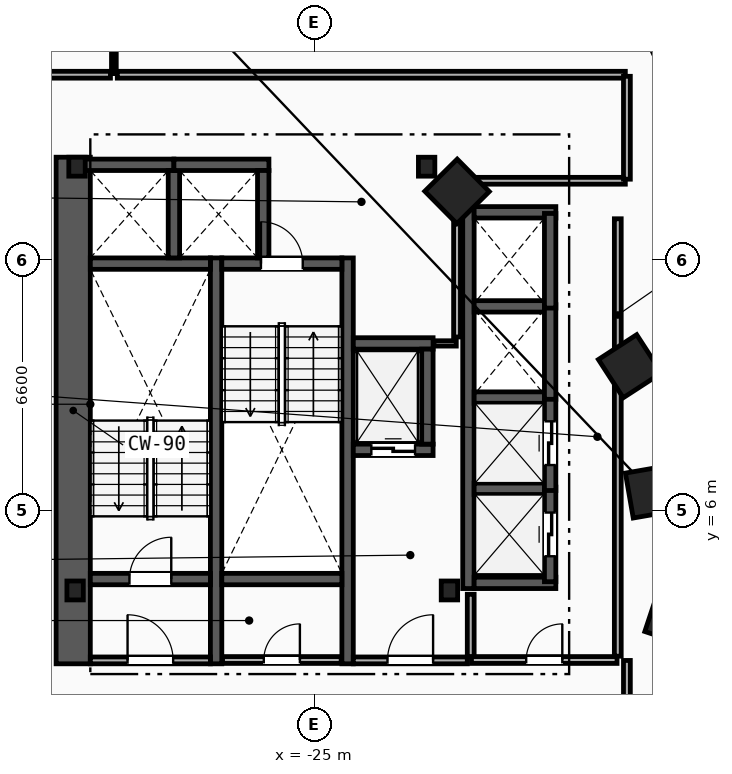
"""IFC4 building model, lengths in metres.
Left out: names, types, materials, properties, quantities, classifications, styles, units other than length and angle.
Written with IfcOpenShell. Run it as: python <this file> out.ifc"""

import sys

from ifc_helpers import new_model, si_unit, direction, frame, frame_2d, origin, origin_2d, place, context, subcontext, project, spatial, rectangle, i_section, extrude, element, fill, save


model = new_model("IFC4")
c1 = context("Model", 3, precision=1e-05, world=origin(), true_north=direction((0.0, 1.0)))
c2 = subcontext(c1, "Body", "Model", "MODEL_VIEW")
j1 = project(units=[si_unit("LENGTHUNIT", "METRE"), si_unit("PLANEANGLEUNIT", "RADIAN")], contexts=[c1])
p1 = place(None, origin())
s1 = spatial("IfcSite", under=j1, at=p1, CompositionType="ELEMENT")
p2 = place(p1, origin())
s2 = spatial("IfcBuilding", under=s1, at=p2, CompositionType="ELEMENT")
p3 = place(p2, frame((0.0, 0.0, 50.6)))
s3 = spatial("IfcBuildingStorey", under=s2, at=p3, CompositionType="ELEMENT", Elevation=50.6)
for number, where, z_axis, x_axis in (
    (1, (-31.3, 3.9, 0.0), (0.0, 0.0, 1.0), (1.0, 0.0, 0.0)),
    (2, (-21.45, 3.9, 0.0), (0.0, 0.0, 1.0), (1.0, 0.0, 0.0)),
    (3, (-22.05, 15.05, 0.0), (0.0, 0.0, 1.0), (1.0, 0.0, 0.0)),
    (4, (-31.25, 15.05, 0.0), (0.0, 0.0, 1.0), (1.0, 0.0, 0.0)),
):
    element("IfcColumn", number, at=place(p3, frame(where, z_axis=z_axis, x_axis=x_axis)), inside=s3, PredefinedType="COLUMN", context=c2, shape_type="SweptSolid", body=[
        extrude(i_section(OverallWidth=0.432, OverallDepth=0.498, WebThickness=0.056, FlangeThickness=0.089, FilletRadius=0.018, at=origin_2d()), origin(), (0.0, 0.0, 1.0), 3.8),
    ])
for number, where, z_axis, x_axis in (
    (5, (-15.55, 3.2, 0.0), (0.0, 0.0, 1.0), (0.315, 0.949, 0.0)),
    (6, (-16.125, 6.5, 0.0), (0.0, 0.0, 1.0), (-0.172, 0.985, 0.0)),
    (7, (-16.7, 9.8, 0.0), (0.0, 0.0, 1.0), (-0.544, 0.839, 0.0)),
    (8, (-21.25, 14.4, 0.0), (0.0, 0.0, 1.0), (-0.703, 0.711, 0.0)),
):
    element("IfcColumn", number, at=place(p3, frame(where, z_axis=z_axis, x_axis=x_axis)), inside=s3, PredefinedType="COLUMN", context=c2, shape_type="SweptSolid", body=[
        extrude(rectangle(XDim=1.2, YDim=1.2, at=origin_2d()), origin(), (0.0, 0.0, 1.0), 3.8),
    ])
p4 = place(p3, frame((-31.35, 1.97, 0.0), z_axis=(0.0, 0.0, 1.0), x_axis=(0.0, 1.0, 0.0)))
e9 = element("IfcWall", 9, at=p4, inside=s3, PredefinedType="SHEAR", context=c2, shape_type="SweptSolid", body=[
    extrude(rectangle(XDim=13.33, YDim=0.9, at=frame_2d((6.665, 0.0))), origin(), (0.0, 0.0, 1.0), 3.5),
])
for number, where, z_axis, x_axis in (
    (10, (-27.59, 1.97, 0.0), (0.0, 0.0, 1.0), (0.0, 1.0, 0.0)),
    (11, (-24.13, 1.97, 0.0), (0.0, 0.0, 1.0), (0.0, 1.0, 0.0)),
):
    element("IfcWall", number, at=place(p3, frame(where, z_axis=z_axis, x_axis=x_axis)), inside=s3, PredefinedType="SHEAR", context=c2, shape_type="SweptSolid", body=[
        extrude(rectangle(XDim=10.68, YDim=0.3, at=frame_2d((5.34, 0.0))), origin(), (0.0, 0.0, 1.0), 3.5),
    ])
p5 = place(p3, frame((-30.9, 4.2, 0.0), z_axis=(0.0, 0.0, 1.0), x_axis=(1.0, 0.0, 0.0)))
e12 = element("IfcWall", 12, at=p5, inside=s3, PredefinedType="SHEAR", context=c2, shape_type="SweptSolid", body=[
    extrude(rectangle(XDim=3.16, YDim=0.3, at=frame_2d((1.58, 0.0))), origin(), (0.0, 0.0, 1.0), 3.5),
])
p6 = place(p5, frame((1.03, 0.0, 0.0)))
e13 = element("IfcOpeningElement", 13, at=p6, cuts=e12, PredefinedType="OPENING", context=c2, shape_type="SweptSolid", body=[
    extrude(rectangle(XDim=1.1, YDim=2.15, at=frame_2d((0.55, 1.075))), frame((0.0, 0.16, 0.0), z_axis=(0.0, -1.0, 0.0), x_axis=(1.0, 0.0, 0.0)), (0.0, 0.0, 1.0), 0.32),
])
p7 = place(p3, frame((-30.9, 12.5, 0.0), z_axis=(0.0, 0.0, 1.0), x_axis=(1.0, 0.0, 0.0)))
e14 = element("IfcWall", 14, at=p7, inside=s3, PredefinedType="SHEAR", context=c2, shape_type="SweptSolid", body=[
    extrude(rectangle(XDim=3.16, YDim=0.3, at=frame_2d((1.58, 0.0))), origin(), (0.0, 0.0, 1.0), 3.5),
])
p8 = place(p3, frame((-27.44, 12.5, 0.0), z_axis=(0.0, 0.0, 1.0), x_axis=(1.0, 0.0, 0.0)))
e15 = element("IfcWall", 15, at=p8, inside=s3, PredefinedType="SHEAR", context=c2, shape_type="SweptSolid", body=[
    extrude(rectangle(XDim=3.16, YDim=0.3, at=frame_2d((1.58, 0.0))), origin(), (0.0, 0.0, 1.0), 3.5),
])
p9 = place(p8, frame((1.03, 0.0, 0.0)))
e16 = element("IfcOpeningElement", 16, at=p9, cuts=e15, PredefinedType="OPENING", context=c2, shape_type="SweptSolid", body=[
    extrude(rectangle(XDim=1.1, YDim=2.15, at=frame_2d((0.55, 1.075))), frame((0.0, 0.16, 0.0), z_axis=(0.0, -1.0, 0.0), x_axis=(1.0, 0.0, 0.0)), (0.0, 0.0, 1.0), 0.32),
])
p10 = place(p3, frame((-27.44, 4.2, 0.0), z_axis=(0.0, 0.0, 1.0), x_axis=(1.0, 0.0, 0.0)))
e17 = element("IfcWall", 17, at=p10, inside=s3, PredefinedType="SHEAR", context=c2, shape_type="SweptSolid", body=[
    extrude(rectangle(XDim=3.16, YDim=0.3, at=frame_2d((1.58, 0.0))), origin(), (0.0, 0.0, 1.0), 3.5),
])
p11 = place(p3, frame((-20.89, 2.15, 0.0), z_axis=(0.0, 0.0, 1.0), x_axis=(0.0, 1.0, 0.0)))
e18 = element("IfcWall", 18, at=p11, inside=s3, PredefinedType="PARTITIONING", context=c2, shape_type="SweptSolid", body=[
    extrude(rectangle(XDim=1.65, YDim=0.18, at=frame_2d((0.825, 0.0))), origin(), (0.0, 0.0, 1.0), 3.5),
])
p12 = place(p3, frame((-23.98, 2.06, 0.0), z_axis=(0.0, 0.0, 1.0), x_axis=(1.0, 0.0, 0.0)))
e19 = element("IfcWall", 19, at=p12, inside=s3, PredefinedType="PARTITIONING", context=c2, shape_type="SweptSolid", body=[
    extrude(rectangle(XDim=3.0, YDim=0.18, at=frame_2d((1.5, 0.0))), origin(), (0.0, 0.0, 1.0), 3.5),
])
p13 = place(p12, frame((0.9, 0.0, 0.0)))
e20 = element("IfcOpeningElement", 20, at=p13, cuts=e19, PredefinedType="OPENING", context=c2, shape_type="SweptSolid", body=[
    extrude(rectangle(XDim=1.2, YDim=2.15, at=frame_2d((0.6, 1.075))), frame((0.0, 0.1, 0.0), z_axis=(0.0, -1.0, 0.0), x_axis=(1.0, 0.0, 0.0)), (0.0, 0.0, 1.0), 0.2),
])
p14 = place(p3, frame((-30.9, 2.06, 0.0), z_axis=(0.0, 0.0, 1.0), x_axis=(1.0, 0.0, 0.0)))
e21 = element("IfcWall", 21, at=p14, inside=s3, PredefinedType="PARTITIONING", context=c2, shape_type="SweptSolid", body=[
    extrude(rectangle(XDim=3.16, YDim=0.18, at=frame_2d((1.58, 0.0))), origin(), (0.0, 0.0, 1.0), 3.5),
])
p15 = place(p14, frame((0.98, 0.0, 0.0)))
e22 = element("IfcOpeningElement", 22, at=p15, cuts=e21, PredefinedType="OPENING", context=c2, shape_type="SweptSolid", body=[
    extrude(rectangle(XDim=1.2, YDim=2.15, at=frame_2d((0.6, 1.075))), frame((0.0, 0.1, 0.0), z_axis=(0.0, -1.0, 0.0), x_axis=(1.0, 0.0, 0.0)), (0.0, 0.0, 1.0), 0.2),
])
p16 = place(p3, frame((-23.98, 7.6, 0.0), z_axis=(0.0, 0.0, 1.0), x_axis=(1.0, 0.0, 0.0)))
e23 = element("IfcWall", 23, at=p16, inside=s3, PredefinedType="SHEAR", context=c2, shape_type="SweptSolid", body=[
    extrude(rectangle(XDim=2.1, YDim=0.3, at=frame_2d((1.05, 0.0))), origin(), (0.0, 0.0, 1.0), 3.5),
])
p17 = place(p16, frame((0.475, 0.0, 0.0)))
e24 = element("IfcOpeningElement", 24, at=p17, cuts=e23, PredefinedType="OPENING", context=c2, shape_type="SweptSolid", body=[
    extrude(rectangle(XDim=1.15, YDim=2.2, at=frame_2d((0.575, 1.1))), frame((0.0, 0.16, 0.0), z_axis=(0.0, -1.0, 0.0), x_axis=(1.0, 0.0, 0.0)), (0.0, 0.0, 1.0), 0.32),
])
p18 = place(p3, frame((-23.98, 10.4, 0.0), z_axis=(0.0, 0.0, 1.0), x_axis=(1.0, 0.0, 0.0)))
e25 = element("IfcWall", 25, at=p18, inside=s3, PredefinedType="SHEAR", context=c2, shape_type="SweptSolid", body=[
    extrude(rectangle(XDim=2.1, YDim=0.3, at=frame_2d((1.05, 0.0))), origin(), (0.0, 0.0, 1.0), 3.5),
])
for number, where, z_axis, x_axis in (
    (26, (-22.03, 7.75, 0.0), (0.0, 0.0, 1.0), (0.0, 1.0, 0.0)),
    (27, (-31.2, 15.1, 0.0), (0.0, 0.0, 1.0), (1.0, 0.0, 0.0)),
):
    element("IfcWall", number, at=place(p3, frame(where, z_axis=z_axis, x_axis=x_axis)), inside=s3, PredefinedType="SHEAR", context=c2, shape_type="SweptSolid", body=[
        extrude(rectangle(XDim=2.5, YDim=0.3, at=frame_2d((1.25, 0.0))), origin(), (0.0, 0.0, 1.0), 3.5),
    ])
p19 = place(p3, frame((-28.7, 12.65, 0.0), z_axis=(0.0, 0.0, 1.0), x_axis=(0.0, 1.0, 0.0)))
e28 = element("IfcWall", 28, at=p19, inside=s3, PredefinedType="SHEAR", context=c2, shape_type="SweptSolid", body=[
    extrude(rectangle(XDim=2.3, YDim=0.3, at=frame_2d((1.15, 0.0))), origin(), (0.0, 0.0, 1.0), 3.5),
])
p20 = place(p3, frame((-28.7, 15.1, 0.0), z_axis=(0.0, 0.0, 1.0), x_axis=(1.0, 0.0, 0.0)))
e29 = element("IfcWall", 29, at=p20, inside=s3, PredefinedType="SHEAR", context=c2, shape_type="SweptSolid", body=[
    extrude(rectangle(XDim=2.5, YDim=0.3, at=frame_2d((1.25, 0.0))), origin(), (0.0, 0.0, 1.0), 3.5),
])
p21 = place(p3, frame((-26.35, 12.65, 0.0), z_axis=(0.0, 0.0, 1.0), x_axis=(0.0, 1.0, 0.0)))
e30 = element("IfcWall", 30, at=p21, inside=s3, PredefinedType="SHEAR", context=c2, shape_type="SweptSolid", body=[
    extrude(rectangle(XDim=2.3, YDim=0.3, at=frame_2d((1.15, 0.0))), origin(), (0.0, 0.0, 1.0), 3.5),
])
p22 = place(p3, frame((-20.95, 3.95, 0.0), z_axis=(0.0, 0.0, 1.0), x_axis=(0.0, 1.0, 0.0)))
e31 = element("IfcWall", 31, at=p22, inside=s3, PredefinedType="SHEAR", context=c2, shape_type="SweptSolid", body=[
    extrude(rectangle(XDim=10.05, YDim=0.3, at=frame_2d((5.025, 0.0))), origin(), (0.0, 0.0, 1.0), 3.5),
])
for number, where, z_axis, x_axis in (
    (32, (-20.8, 4.1, 0.0), (0.0, 0.0, 1.0), (1.0, 0.0, 0.0)),
    (33, (-20.8, 13.85, 0.0), (0.0, 0.0, 1.0), (1.0, 0.0, 0.0)),
):
    element("IfcWall", number, at=place(p3, frame(where, z_axis=z_axis, x_axis=x_axis)), inside=s3, PredefinedType="SHEAR", context=c2, shape_type="SweptSolid", body=[
        extrude(rectangle(XDim=2.15, YDim=0.3, at=frame_2d((1.075, 0.0))), origin(), (0.0, 0.0, 1.0), 3.5),
    ])
for number, where, z_axis, x_axis in (
    (34, (-20.8, 6.575, 0.0), (0.0, 0.0, 1.0), (1.0, 0.0, 0.0)),
    (35, (-20.8, 8.975, 0.0), (0.0, 0.0, 1.0), (1.0, 0.0, 0.0)),
    (36, (-20.8, 11.375, 0.0), (0.0, 0.0, 1.0), (1.0, 0.0, 0.0)),
):
    element("IfcWall", number, at=place(p3, frame(where, z_axis=z_axis, x_axis=x_axis)), inside=s3, PredefinedType="SHEAR", context=c2, shape_type="SweptSolid", body=[
        extrude(rectangle(XDim=1.85, YDim=0.3, at=frame_2d((0.925, 0.0))), origin(), (0.0, 0.0, 1.0), 3.5),
    ])
p23 = place(p3, frame((-18.8, 4.13, 0.0), z_axis=(0.0, 0.0, 1.0), x_axis=(0.0, 1.0, 0.0)))
e37 = element("IfcWall", 37, at=p23, inside=s3, PredefinedType="SHEAR", context=c2, shape_type="SweptSolid", body=[
    extrude(rectangle(XDim=2.49, YDim=0.3, at=frame_2d((1.245, 0.0))), origin(), (0.0, 0.0, 1.0), 3.5),
])
p24 = place(p23, frame((0.67, 0.0, 0.0)))
e38 = element("IfcOpeningElement", 38, at=p24, cuts=e37, PredefinedType="OPENING", context=c2, shape_type="SweptSolid", body=[
    extrude(rectangle(XDim=1.15, YDim=2.2, at=frame_2d((0.575, 1.1))), frame((0.0, 0.16, 0.0), z_axis=(0.0, -1.0, 0.0), x_axis=(1.0, 0.0, 0.0)), (0.0, 0.0, 1.0), 0.32),
])
p25 = place(p3, frame((-18.8, 6.53, 0.0), z_axis=(0.0, 0.0, 1.0), x_axis=(0.0, 1.0, 0.0)))
e39 = element("IfcWall", 39, at=p25, inside=s3, PredefinedType="SHEAR", context=c2, shape_type="SweptSolid", body=[
    extrude(rectangle(XDim=2.49, YDim=0.3, at=frame_2d((1.245, 0.0))), origin(), (0.0, 0.0, 1.0), 3.5),
])
p26 = place(p25, frame((0.67, 0.0, 0.0)))
e40 = element("IfcOpeningElement", 40, at=p26, cuts=e39, PredefinedType="OPENING", context=c2, shape_type="SweptSolid", body=[
    extrude(rectangle(XDim=1.15, YDim=2.2, at=frame_2d((0.575, 1.1))), frame((0.0, 0.16, 0.0), z_axis=(0.0, -1.0, 0.0), x_axis=(1.0, 0.0, 0.0)), (0.0, 0.0, 1.0), 0.32),
])
for number, where, z_axis, x_axis in (
    (41, (-18.8, 8.93, 0.0), (0.0, 0.0, 1.0), (0.0, 1.0, 0.0)),
    (42, (-18.8, 11.33, 0.0), (0.0, 0.0, 1.0), (0.0, 1.0, 0.0)),
):
    element("IfcWall", number, at=place(p3, frame(where, z_axis=z_axis, x_axis=x_axis)), inside=s3, PredefinedType="SHEAR", context=c2, shape_type="SweptSolid", body=[
        extrude(rectangle(XDim=2.49, YDim=0.3, at=frame_2d((1.245, 0.0))), origin(), (0.0, 0.0, 1.0), 3.5),
    ])
p27 = place(p3, frame((-17.02, 2.17, 0.0), z_axis=(0.0, 0.0, 1.0), x_axis=(0.0, 1.0, 0.0)))
e43 = element("IfcWall", 43, at=p27, inside=s3, PredefinedType="PARTITIONING", context=c2, shape_type="SweptSolid", body=[
    extrude(rectangle(XDim=11.51, YDim=0.18, at=frame_2d((5.755, 0.0))), origin(), (0.0, 0.0, 1.0), 3.5),
])
p28 = place(p3, frame((-20.87, 2.07, 0.0), z_axis=(0.0, 0.0, 1.0), x_axis=(1.0, 0.0, 0.0)))
e44 = element("IfcWall", 44, at=p28, inside=s3, PredefinedType="PARTITIONING", context=c2, shape_type="SweptSolid", body=[
    extrude(rectangle(XDim=3.83, YDim=0.18, at=frame_2d((1.915, 0.0))), origin(), (0.0, 0.0, 1.0), 3.5),
])
p29 = place(p28, frame((1.44, 0.0, 0.0)))
e45 = element("IfcOpeningElement", 45, at=p29, cuts=e44, PredefinedType="OPENING", context=c2, shape_type="SweptSolid", body=[
    extrude(rectangle(XDim=0.95, YDim=2.1, at=frame_2d((0.475, 1.05))), frame((0.0, 0.1, 0.0), z_axis=(0.0, -1.0, 0.0), x_axis=(1.0, 0.0, 0.0)), (0.0, 0.0, 1.0), 0.2),
])
p30 = place(p3, frame((-21.86, 10.4, 0.0), z_axis=(0.0, 0.0, 1.0), x_axis=(1.0, 0.0, 0.0)))
e46 = element("IfcWall", 46, at=p30, inside=s3, PredefinedType="PARTITIONING", context=c2, shape_type="SweptSolid", body=[
    extrude(rectangle(XDim=0.59, YDim=0.14, at=frame_2d((0.295, 0.0))), origin(), (0.0, 0.0, 1.0), 3.5),
])
p31 = place(p3, frame((-21.25, 10.57, 0.0), z_axis=(0.0, 0.0, 1.0), x_axis=(0.0, 1.0, 0.0)))
e47 = element("IfcWall", 47, at=p31, inside=s3, PredefinedType="PARTITIONING", context=c2, shape_type="SweptSolid", body=[
    extrude(rectangle(XDim=4.36, YDim=0.18, at=frame_2d((2.18, 0.0))), origin(), (0.0, 0.0, 1.0), 3.5),
])
p32 = place(p3, frame((-27.42, 2.07, 0.0), z_axis=(0.0, 0.0, 1.0), x_axis=(1.0, 0.0, 0.0)))
e48 = element("IfcWall", 48, at=p32, inside=s3, PredefinedType="PARTITIONING", context=c2, shape_type="SweptSolid", body=[
    extrude(rectangle(XDim=3.12, YDim=0.18, at=frame_2d((1.56, 0.0))), origin(), (0.0, 0.0, 1.0), 3.5),
])
p33 = place(p32, frame((1.085, 0.0, 0.0)))
e49 = element("IfcOpeningElement", 49, at=p33, cuts=e48, PredefinedType="OPENING", context=c2, shape_type="SweptSolid", body=[
    extrude(rectangle(XDim=0.95, YDim=2.1, at=frame_2d((0.475, 1.05))), frame((0.0, 0.1, 0.0), z_axis=(0.0, -1.0, 0.0), x_axis=(1.0, 0.0, 0.0)), (0.0, 0.0, 1.0), 0.2),
])
p34 = place(p3, frame((-30.28, 17.5, 0.0), z_axis=(0.0, 0.0, 1.0), x_axis=(0.0, 1.0, 0.0)))
e50 = element("IfcWall", 50, at=p34, inside=s3, PredefinedType="PARTITIONING", context=c2, shape_type="SweptSolid", body=[
    extrude(rectangle(XDim=8.485, YDim=0.125, at=frame_2d((4.243, 0.0))), origin(), (0.0, 0.0, 1.0), 3.5),
])
p35 = place(p3, frame((-16.822, 17.47, 0.0), z_axis=(0.0, 0.0, 1.0), x_axis=(-1.0, 0.0, 0.0)))
e51 = element("IfcWall", 51, at=p35, inside=s3, PredefinedType="PARTITIONING", context=c2, shape_type="SweptSolid", body=[
    extrude(rectangle(XDim=13.368, YDim=0.18, at=frame_2d((6.684, 0.0))), origin(), (0.0, 0.0, 1.0), 3.5),
])
p36 = place(p3, frame((-21.178, 14.68, 0.0), z_axis=(0.0, 0.0, 1.0), x_axis=(1.0, 0.0, 0.0)))
e52 = element("IfcWall", 52, at=p36, inside=s3, PredefinedType="PARTITIONING", context=c2, shape_type="SweptSolid", body=[
    extrude(rectangle(XDim=4.357, YDim=0.18, at=frame_2d((2.178, 0.0))), origin(), (0.0, 0.0, 1.0), 3.5),
])
p37 = place(p3, frame((-16.78, 14.721, 0.0), z_axis=(0.0, 0.0, 1.0), x_axis=(0.0, 1.0, 0.0)))
e53 = element("IfcWall", 53, at=p37, inside=s3, PredefinedType="PARTITIONING", context=c2, shape_type="SweptSolid", body=[
    extrude(rectangle(XDim=2.707, YDim=0.18, at=frame_2d((1.354, 0.0))), origin(), (0.0, 0.0, 1.0), 3.5),
])
p38 = place(p3, frame((-16.78, -0.329, 0.0), z_axis=(0.0, 0.0, 1.0), x_axis=(0.0, 1.0, 0.0)))
e54 = element("IfcWall", 54, at=p38, inside=s3, PredefinedType="PARTITIONING", context=c2, shape_type="SweptSolid", body=[
    extrude(rectangle(XDim=2.387, YDim=0.18, at=frame_2d((1.194, 0.0))), origin(), (0.0, 0.0, 1.0), 3.5),
])
p39 = place(p3, frame((-30.37, 17.47, 0.0), z_axis=(0.0, 0.0, 1.0), x_axis=(-1.0, 0.0, 0.0)))
e55 = element("IfcWall", 55, at=p39, inside=s3, PredefinedType="PARTITIONING", context=c2, shape_type="SweptSolid", body=[
    extrude(rectangle(XDim=3.258, YDim=0.18, at=frame_2d((1.629, 0.0))), origin(), (0.0, 0.0, 1.0), 3.5),
])
p40 = place(p6, origin())
e56 = element("IfcDoor", 56, at=p40, inside=s3, OperationType="SINGLE_SWING_RIGHT", PredefinedType="DOOR", context=c2, shape_type="SweptSolid", body=[
    extrude(rectangle(XDim=1.1, YDim=2.15, at=frame_2d((0.55, 1.075))), frame((0.0, 0.025, 0.0), z_axis=(0.0, -1.0, 0.0), x_axis=(1.0, 0.0, 0.0)), (0.0, 0.0, 1.0), 0.05),
])
fill(e13, e56)
p41 = place(p9, origin())
e57 = element("IfcDoor", 57, at=p41, inside=s3, OperationType="SINGLE_SWING_LEFT", PredefinedType="DOOR", context=c2, shape_type="SweptSolid", body=[
    extrude(rectangle(XDim=1.1, YDim=2.15, at=frame_2d((0.55, 1.075))), frame((0.0, 0.025, 0.0), z_axis=(0.0, -1.0, 0.0), x_axis=(1.0, 0.0, 0.0)), (0.0, 0.0, 1.0), 0.05),
])
fill(e16, e57)
p42 = place(p13, origin())
e58 = element("IfcDoor", 58, at=p42, inside=s3, OperationType="SINGLE_SWING_RIGHT", PredefinedType="DOOR", context=c2, shape_type="SweptSolid", body=[
    extrude(rectangle(XDim=1.2, YDim=2.15, at=frame_2d((0.6, 1.075))), frame((0.0, 0.025, 0.0), z_axis=(0.0, -1.0, 0.0), x_axis=(1.0, 0.0, 0.0)), (0.0, 0.0, 1.0), 0.05),
])
fill(e20, e58)
p43 = place(p15, origin())
e59 = element("IfcDoor", 59, at=p43, inside=s3, OperationType="SINGLE_SWING_LEFT", PredefinedType="DOOR", context=c2, shape_type="SweptSolid", body=[
    extrude(rectangle(XDim=1.2, YDim=2.15, at=frame_2d((0.6, 1.075))), frame((0.0, 0.025, 0.0), z_axis=(0.0, -1.0, 0.0), x_axis=(1.0, 0.0, 0.0)), (0.0, 0.0, 1.0), 0.05),
])
fill(e22, e59)
p44 = place(p17, origin())
e60 = element("IfcDoor", 60, at=p44, inside=s3, OperationType="SLIDING_TO_LEFT", PredefinedType="TRAPDOOR", context=c2, shape_type="SweptSolid", body=[
    extrude(rectangle(XDim=1.15, YDim=2.2, at=frame_2d((0.575, 1.1))), frame((0.0, 0.025, 0.0), z_axis=(0.0, -1.0, 0.0), x_axis=(1.0, 0.0, 0.0)), (0.0, 0.0, 1.0), 0.05),
])
fill(e24, e60)
p45 = place(p24, origin())
e61 = element("IfcDoor", 61, at=p45, inside=s3, OperationType="SLIDING_TO_LEFT", PredefinedType="TRAPDOOR", context=c2, shape_type="SweptSolid", body=[
    extrude(rectangle(XDim=1.15, YDim=2.2, at=frame_2d((0.575, 1.1))), frame((0.0, 0.025, 0.0), z_axis=(0.0, -1.0, 0.0), x_axis=(1.0, 0.0, 0.0)), (0.0, 0.0, 1.0), 0.05),
])
fill(e38, e61)
p46 = place(p26, origin())
e62 = element("IfcDoor", 62, at=p46, inside=s3, OperationType="SLIDING_TO_LEFT", PredefinedType="TRAPDOOR", context=c2, shape_type="SweptSolid", body=[
    extrude(rectangle(XDim=1.15, YDim=2.2, at=frame_2d((0.575, 1.1))), frame((0.0, 0.025, 0.0), z_axis=(0.0, -1.0, 0.0), x_axis=(1.0, 0.0, 0.0)), (0.0, 0.0, 1.0), 0.05),
])
fill(e40, e62)
p47 = place(p29, origin())
e63 = element("IfcDoor", 63, at=p47, inside=s3, OperationType="SINGLE_SWING_RIGHT", PredefinedType="DOOR", context=c2, shape_type="SweptSolid", body=[
    extrude(rectangle(XDim=0.95, YDim=2.1, at=frame_2d((0.475, 1.05))), frame((0.0, 0.025, 0.0), z_axis=(0.0, -1.0, 0.0), x_axis=(1.0, 0.0, 0.0)), (0.0, 0.0, 1.0), 0.05),
])
fill(e45, e63)
p48 = place(p33, origin())
e64 = element("IfcDoor", 64, at=p48, inside=s3, OperationType="SINGLE_SWING_RIGHT", PredefinedType="DOOR", context=c2, shape_type="SweptSolid", body=[
    extrude(rectangle(XDim=0.95, YDim=2.1, at=frame_2d((0.475, 1.05))), frame((0.0, 0.025, 0.0), z_axis=(0.0, -1.0, 0.0), x_axis=(1.0, 0.0, 0.0)), (0.0, 0.0, 1.0), 0.05),
])
fill(e49, e64)
save(model, sys.argv[1])
